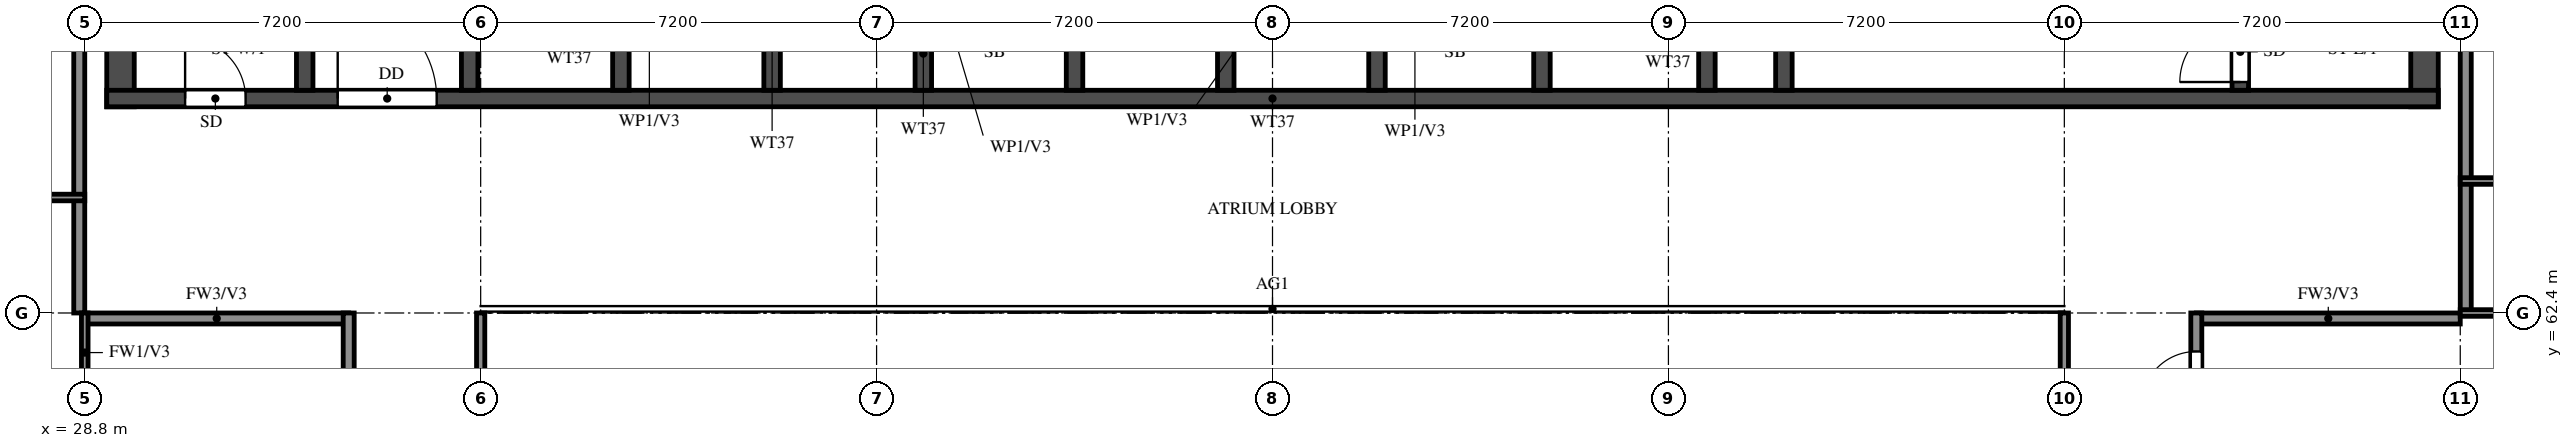
"""IFC4 building model, lengths in metres.
Left out: names, types, materials, properties, quantities, classifications, styles, units other than length and angle.
Written with IfcOpenShell. Run it as: python <this file> out.ifc"""

import sys

from ifc_helpers import new_model, si_unit, direction, frame, frame_2d, origin, place, context, subcontext, project, spatial, rectangle, extrude, element, fill, save


model = new_model("IFC4")
c1 = context("Model", 3, precision=1e-05, world=origin(), true_north=direction((0.0, 1.0)))
c2 = subcontext(c1, "Body", "Model", "MODEL_VIEW")
j1 = project(units=[si_unit("LENGTHUNIT", "METRE"), si_unit("PLANEANGLEUNIT", "RADIAN")], contexts=[c1])
p1 = place(None, origin())
s1 = spatial("IfcSite", under=j1, at=p1, CompositionType="ELEMENT")
p2 = place(p1, origin())
s2 = spatial("IfcBuilding", under=s1, at=p2, CompositionType="ELEMENT")
p3 = place(p2, frame((0.0, 0.0, 260.5)))
s3 = spatial("IfcBuildingStorey", under=s2, at=p3, CompositionType="ELEMENT", Elevation=260.5)
for number, where, z_axis, x_axis in (
    (1, (29.45, 66.15, 0.0), (0.0, 0.0, 1.0), (0.0, 1.0, 0.0)),
    (2, (71.35, 66.15, 0.0), (0.0, 0.0, 1.0), (0.0, 1.0, 0.0)),
):
    element("IfcWall", number, at=place(p3, frame(where, z_axis=z_axis, x_axis=x_axis)), inside=s3, PredefinedType="SHEAR", context=c2, shape_type="SweptSolid", body=[
        extrude(rectangle(XDim=11.85, YDim=0.5, at=frame_2d((5.925, 0.0))), origin(), (0.0, 0.0, 1.0), 3.22),
    ])
p4 = place(p3, frame((29.2, 66.3, 0.0), z_axis=(0.0, 0.0, 1.0), x_axis=(1.0, 0.0, 0.0)))
e3 = element("IfcWall", 3, at=p4, inside=s3, PredefinedType="SHEAR", context=c2, shape_type="SweptSolid", body=[
    extrude(rectangle(XDim=42.4, YDim=0.3, at=frame_2d((21.2, 0.0))), origin(), (0.0, 0.0, 1.0), 3.22),
])
p5 = place(p4, frame((1.425, 0.0, 0.0)))
e4 = element("IfcOpeningElement", 4, at=p5, cuts=e3, PredefinedType="OPENING", context=c2, shape_type="SweptSolid", body=[
    extrude(rectangle(XDim=1.1, YDim=2.1, at=frame_2d((0.55, 1.05))), frame((0.0, 0.16, 0.0), z_axis=(0.0, -1.0, 0.0), x_axis=(1.0, 0.0, 0.0)), (0.0, 0.0, 1.0), 0.32),
])
p6 = place(p4, frame((4.2, 0.0, 0.0)))
e5 = element("IfcOpeningElement", 5, at=p6, cuts=e3, PredefinedType="OPENING", context=c2, shape_type="SweptSolid", body=[
    extrude(rectangle(XDim=1.8, YDim=2.1, at=frame_2d((0.9, 1.05))), frame((0.0, 0.16, 0.0), z_axis=(0.0, -1.0, 0.0), x_axis=(1.0, 0.0, 0.0)), (0.0, 0.0, 1.0), 0.32),
])
p7 = place(p3, frame((32.8, 66.45, 0.0), z_axis=(0.0, 0.0, 1.0), x_axis=(0.0, 1.0, 0.0)))
e6 = element("IfcWall", 6, at=p7, inside=s3, PredefinedType="SHEAR", context=c2, shape_type="SweptSolid", body=[
    extrude(rectangle(XDim=11.05, YDim=0.3, at=frame_2d((5.525, 0.0))), origin(), (0.0, 0.0, 1.0), 3.22),
])
p8 = place(p3, frame((68.0, 66.45, 0.0), z_axis=(0.0, 0.0, 1.0), x_axis=(0.0, 1.0, 0.0)))
e7 = element("IfcWall", 7, at=p8, inside=s3, PredefinedType="SHEAR", context=c2, shape_type="SweptSolid", body=[
    extrude(rectangle(XDim=11.05, YDim=0.3, at=frame_2d((5.525, 0.0))), origin(), (0.0, 0.0, 1.0), 3.22),
])
p9 = place(p8, frame((0.15, 0.0, 0.0)))
e8 = element("IfcOpeningElement", 8, at=p9, cuts=e7, PredefinedType="OPENING", context=c2, shape_type="SweptSolid", body=[
    extrude(rectangle(XDim=1.1, YDim=2.1, at=frame_2d((0.55, 1.05))), frame((0.0, 0.16, 0.0), z_axis=(0.0, -1.0, 0.0), x_axis=(1.0, 0.0, 0.0)), (0.0, 0.0, 1.0), 0.32),
])
p10 = place(p3, frame((59.7, 66.45, 0.0), z_axis=(0.0, 0.0, 1.0), x_axis=(0.0, 1.0, 0.0)))
e9 = element("IfcWall", 9, at=p10, inside=s3, PredefinedType="SHEAR", context=c2, shape_type="SweptSolid", body=[
    extrude(rectangle(XDim=6.175, YDim=0.3, at=frame_2d((3.087, 0.0))), origin(), (0.0, 0.0, 1.0), 3.22),
])
p11 = place(p10, frame((3.85, 0.0, 0.0)))
e10 = element("IfcOpeningElement", 10, at=p11, cuts=e9, PredefinedType="OPENING", context=c2, shape_type="SweptSolid", body=[
    extrude(rectangle(XDim=1.2, YDim=2.1, at=frame_2d((0.6, 1.05))), frame((0.0, 0.16, 0.0), z_axis=(0.0, -1.0, 0.0), x_axis=(1.0, 0.0, 0.0)), (0.0, 0.0, 1.0), 0.32),
])
for number, where, z_axis, x_axis in (
    (11, (35.8, 66.45, 0.0), (0.0, 0.0, 1.0), (0.0, 1.0, 0.0)),
    (12, (38.55, 66.45, 0.0), (0.0, 0.0, 1.0), (0.0, 1.0, 0.0)),
    (13, (41.3, 66.45, 0.0), (0.0, 0.0, 1.0), (0.0, 1.0, 0.0)),
    (14, (44.05, 66.45, 0.0), (0.0, 0.0, 1.0), (0.0, 1.0, 0.0)),
    (15, (46.8, 66.45, 0.0), (0.0, 0.0, 1.0), (0.0, 1.0, 0.0)),
    (16, (49.55, 66.45, 0.0), (0.0, 0.0, 1.0), (0.0, 1.0, 0.0)),
    (17, (52.3, 66.45, 0.0), (0.0, 0.0, 1.0), (0.0, 1.0, 0.0)),
    (18, (55.3, 66.45, 0.0), (0.0, 0.0, 1.0), (0.0, 1.0, 0.0)),
    (19, (58.3, 66.45, 0.0), (0.0, 0.0, 1.0), (0.0, 1.0, 0.0)),
):
    element("IfcWall", number, at=place(p3, frame(where, z_axis=z_axis, x_axis=x_axis)), inside=s3, PredefinedType="SHEAR", context=c2, shape_type="SweptSolid", body=[
        extrude(rectangle(XDim=2.425, YDim=0.3, at=frame_2d((1.212, 0.0))), origin(), (0.0, 0.0, 1.0), 3.22),
    ])
for number, where, z_axis, x_axis in (
    (20, (28.8, 62.3, 0.0), (0.0, 0.0, 1.0), (1.0, 0.0, 0.0)),
    (21, (67.2, 62.3, 0.0), (0.0, 0.0, 1.0), (1.0, 0.0, 0.0)),
):
    element("IfcWall", number, at=place(p3, frame(where, z_axis=z_axis, x_axis=x_axis)), inside=s3, PredefinedType="SOLIDWALL", context=c2, shape_type="SweptSolid", body=[
        extrude(rectangle(XDim=4.8, YDim=0.2, at=frame_2d((2.4, 0.0))), origin(), (0.0, 0.0, 1.0), 3.22),
    ])
p12 = place(p3, frame((28.7, 62.4, 0.0), z_axis=(0.0, 0.0, 1.0), x_axis=(0.0, 1.0, 0.0)))
e22 = element("IfcWall", 22, at=p12, inside=s3, PredefinedType="SOLIDWALL", context=c2, shape_type="SweptSolid", body=[
    extrude(rectangle(XDim=15.6, YDim=0.2, at=frame_2d((7.8, 0.0))), origin(), (0.0, 0.0, 1.0), 3.22),
])
p13 = place(p3, frame((33.6, 56.4, 0.0), z_axis=(0.0, 0.0, 1.0), x_axis=(0.0, 1.0, 0.0)))
e23 = element("IfcWall", 23, at=p13, inside=s3, PredefinedType="SOLIDWALL", context=c2, shape_type="SweptSolid", body=[
    extrude(rectangle(XDim=6.0, YDim=0.2, at=frame_2d((3.0, 0.0))), origin(), (0.0, 0.0, 1.0), 3.22),
])
p14 = place(p13, frame((3.7, 0.0, 0.0)))
e24 = element("IfcOpeningElement", 24, at=p14, cuts=e23, PredefinedType="OPENING", context=c2, shape_type="SweptSolid", body=[
    extrude(rectangle(XDim=1.0, YDim=2.1, at=frame_2d((0.5, 1.05))), frame((0.0, 0.11, 0.0), z_axis=(0.0, -1.0, 0.0), x_axis=(1.0, 0.0, 0.0)), (0.0, 0.0, 1.0), 0.22),
])
p15 = place(p3, frame((67.2, 60.0, 0.0), z_axis=(0.0, 0.0, 1.0), x_axis=(0.0, 1.0, 0.0)))
e25 = element("IfcWall", 25, at=p15, inside=s3, PredefinedType="SOLIDWALL", context=c2, shape_type="SweptSolid", body=[
    extrude(rectangle(XDim=2.4, YDim=0.2, at=frame_2d((1.2, 0.0))), origin(), (0.0, 0.0, 1.0), 3.22),
])
p16 = place(p15, frame((0.7, 0.0, 0.0)))
e26 = element("IfcOpeningElement", 26, at=p16, cuts=e25, PredefinedType="OPENING", context=c2, shape_type="SweptSolid", body=[
    extrude(rectangle(XDim=1.0, YDim=2.1, at=frame_2d((0.5, 1.05))), frame((0.0, 0.11, 0.0), z_axis=(0.0, -1.0, 0.0), x_axis=(1.0, 0.0, 0.0)), (0.0, 0.0, 1.0), 0.22),
])
p17 = place(p3, frame((72.1, 62.4, 0.0), z_axis=(0.0, 0.0, 1.0), x_axis=(0.0, 1.0, 0.0)))
e27 = element("IfcWall", 27, at=p17, inside=s3, PredefinedType="SOLIDWALL", context=c2, shape_type="SweptSolid", body=[
    extrude(rectangle(XDim=15.6, YDim=0.2, at=frame_2d((7.8, 0.0))), origin(), (0.0, 0.0, 1.0), 3.22),
])
p18 = place(p3, frame((72.0, 62.4, 0.0), z_axis=(0.0, 0.0, 1.0), x_axis=(1.0, 0.0, 0.0)))
e28 = element("IfcWall", 28, at=p18, inside=s3, PredefinedType="PARTITIONING", context=c2, shape_type="SweptSolid", body=[
    extrude(rectangle(XDim=2.4, YDim=0.12, at=frame_2d((1.2, 0.0))), origin(), (0.0, 0.0, 1.0), 3.22),
])
p19 = place(p18, frame((0.75, 0.0, 0.0)))
e29 = element("IfcOpeningElement", 29, at=p19, cuts=e28, PredefinedType="OPENING", context=c2, shape_type="SweptSolid", body=[
    extrude(rectangle(XDim=0.9, YDim=2.1, at=frame_2d((0.45, 1.05))), frame((0.0, 0.07, 0.0), z_axis=(0.0, -1.0, 0.0), x_axis=(1.0, 0.0, 0.0)), (0.0, 0.0, 1.0), 0.14),
])
p20 = place(p3, frame((25.3, 64.5, 0.0), z_axis=(0.0, 0.0, 1.0), x_axis=(1.0, 0.0, 0.0)))
e30 = element("IfcWall", 30, at=p20, inside=s3, PredefinedType="PARTITIONING", context=c2, shape_type="SweptSolid", body=[
    extrude(rectangle(XDim=3.5, YDim=0.12, at=frame_2d((1.75, 0.0))), origin(), (0.0, 0.0, 1.0), 3.22),
])
p21 = place(p3, frame((72.0, 64.8, 0.0), z_axis=(0.0, 0.0, 1.0), x_axis=(1.0, 0.0, 0.0)))
e31 = element("IfcWall", 31, at=p21, inside=s3, PredefinedType="PARTITIONING", context=c2, shape_type="SweptSolid", body=[
    extrude(rectangle(XDim=3.5, YDim=0.12, at=frame_2d((1.75, 0.0))), origin(), (0.0, 0.0, 1.0), 3.22),
])
p22 = place(p21, frame((1.3, 0.0, 0.0)))
e32 = element("IfcOpeningElement", 32, at=p22, cuts=e31, PredefinedType="OPENING", context=c2, shape_type="SweptSolid", body=[
    extrude(rectangle(XDim=0.9, YDim=2.1, at=frame_2d((0.45, 1.05))), frame((0.0, 0.07, 0.0), z_axis=(0.0, -1.0, 0.0), x_axis=(1.0, 0.0, 0.0)), (0.0, 0.0, 1.0), 0.14),
])
p23 = place(p3, frame((28.8, 58.8, 0.0), z_axis=(0.0, 0.0, 1.0), x_axis=(0.0, 1.0, 0.0)))
e33 = element("IfcWall", 33, at=p23, inside=s3, PredefinedType="PARTITIONING", context=c2, shape_type="SweptSolid", body=[
    extrude(rectangle(XDim=3.6, YDim=0.12, at=frame_2d((1.8, 0.0))), origin(), (0.0, 0.0, 1.0), 3.22),
])
p24 = place(p23, frame((0.75, 0.0, 0.0)))
e34 = element("IfcOpeningElement", 34, at=p24, cuts=e33, PredefinedType="OPENING", context=c2, shape_type="SweptSolid", body=[
    extrude(rectangle(XDim=0.9, YDim=2.1, at=frame_2d((0.45, 1.05))), frame((0.0, 0.07, 0.0), z_axis=(0.0, -1.0, 0.0), x_axis=(1.0, 0.0, 0.0)), (0.0, 0.0, 1.0), 0.14),
])
for number, where, z_axis, x_axis in (
    (35, (36.0, 48.0, 0.0), (0.0, 0.0, 1.0), (0.0, 1.0, 0.0)),
    (36, (64.8, 48.0, 0.0), (0.0, 0.0, 1.0), (0.0, 1.0, 0.0)),
):
    element("IfcWall", number, at=place(p3, frame(where, z_axis=z_axis, x_axis=x_axis)), inside=s3, PredefinedType="SOLIDWALL", context=c2, shape_type="SweptSolid", body=[
        extrude(rectangle(XDim=14.4, YDim=0.15, at=frame_2d((7.2, 0.0))), origin(), (0.0, 0.0, 1.0), 2.32),
    ])
p25 = place(p5, origin())
e37 = element("IfcDoor", 37, at=p25, inside=s3, OperationType="SINGLE_SWING_LEFT", PredefinedType="DOOR", context=c2, shape_type="SweptSolid", body=[
    extrude(rectangle(XDim=1.1, YDim=2.1, at=frame_2d((0.55, 1.05))), frame((0.0, 0.025, 0.0), z_axis=(0.0, -1.0, 0.0), x_axis=(1.0, 0.0, 0.0)), (0.0, 0.0, 1.0), 0.05),
])
fill(e4, e37)
p26 = place(p9, origin())
e38 = element("IfcDoor", 38, at=p26, inside=s3, OperationType="SINGLE_SWING_RIGHT", PredefinedType="DOOR", context=c2, shape_type="SweptSolid", body=[
    extrude(rectangle(XDim=1.1, YDim=2.1, at=frame_2d((0.55, 1.05))), frame((0.0, 0.025, 0.0), z_axis=(0.0, -1.0, 0.0), x_axis=(1.0, 0.0, 0.0)), (0.0, 0.0, 1.0), 0.05),
])
fill(e8, e38)
p27 = place(p6, origin())
e39 = element("IfcDoor", 39, at=p27, inside=s3, OperationType="DOUBLE_DOOR_SINGLE_SWING", PredefinedType="DOOR", context=c2, shape_type="SweptSolid", body=[
    extrude(rectangle(XDim=1.8, YDim=2.1, at=frame_2d((0.9, 1.05))), frame((0.0, 0.025, 0.0), z_axis=(0.0, -1.0, 0.0), x_axis=(1.0, 0.0, 0.0)), (0.0, 0.0, 1.0), 0.05),
])
fill(e5, e39)
p28 = place(p16, origin())
e40 = element("IfcDoor", 40, at=p28, inside=s3, OperationType="SINGLE_SWING_RIGHT", PredefinedType="DOOR", context=c2, shape_type="SweptSolid", body=[
    extrude(rectangle(XDim=1.0, YDim=2.1, at=frame_2d((0.5, 1.05))), frame((0.0, 0.025, 0.0), z_axis=(0.0, -1.0, 0.0), x_axis=(1.0, 0.0, 0.0)), (0.0, 0.0, 1.0), 0.05),
])
fill(e26, e40)
save(model, sys.argv[1])
